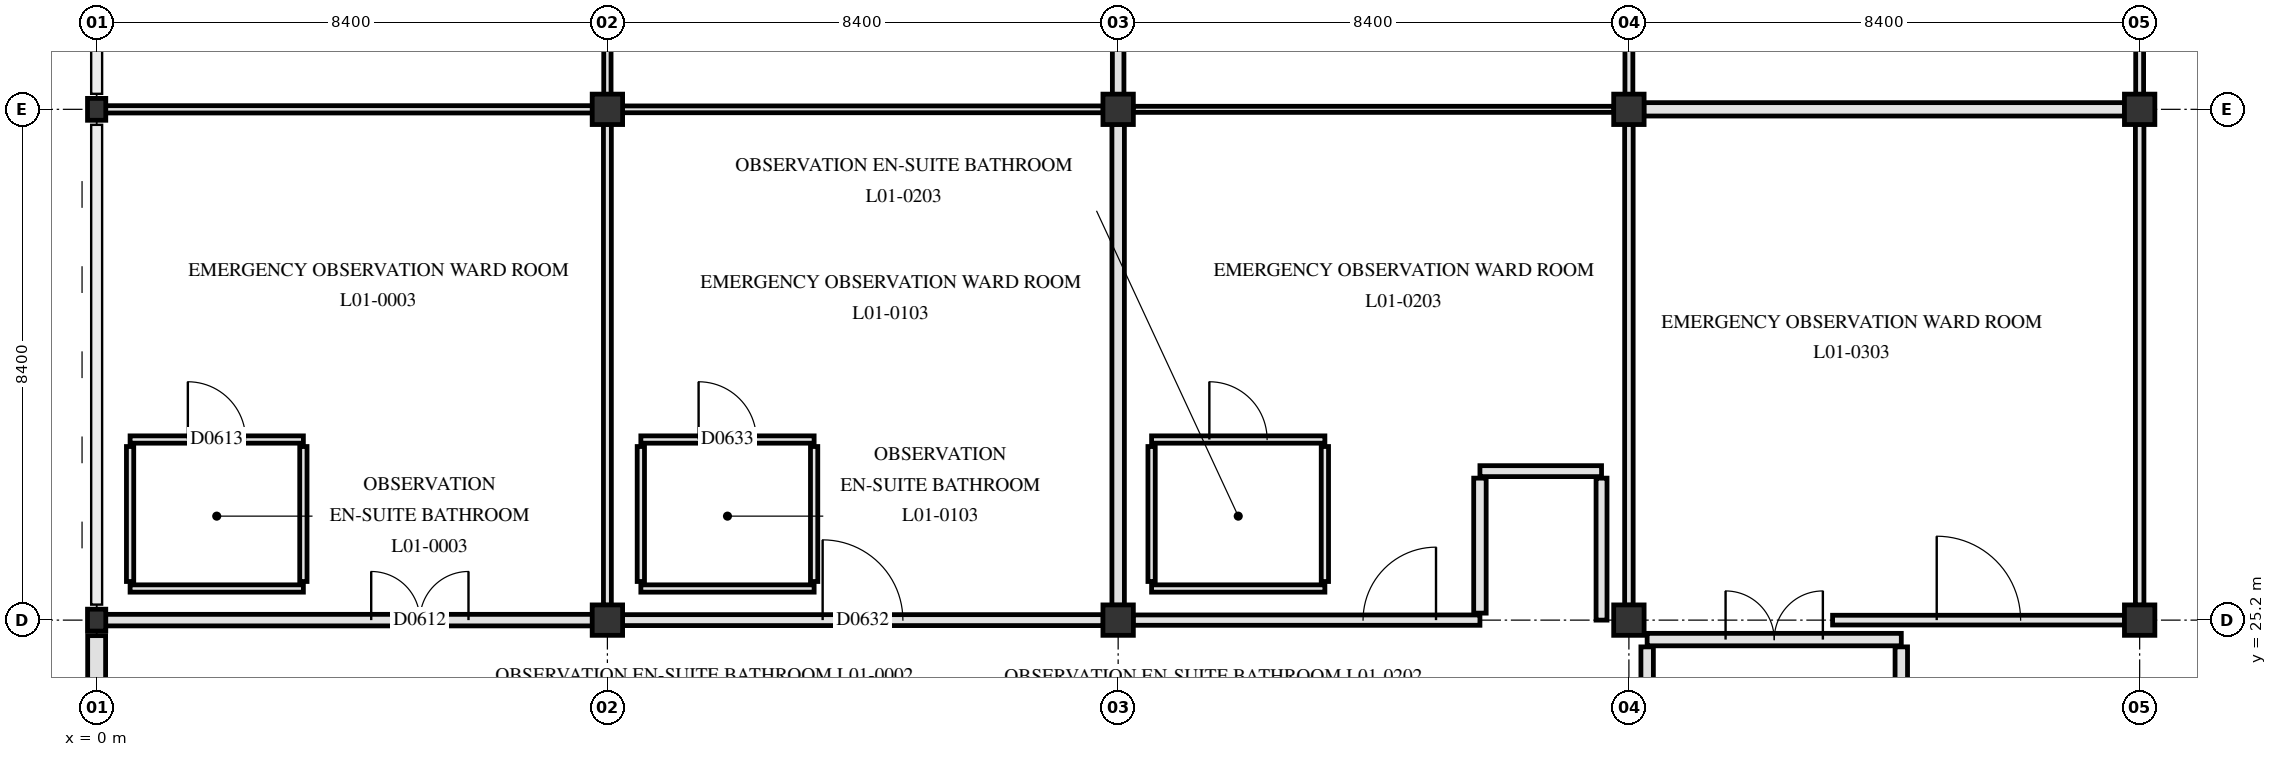
"""IFC4 building model, lengths in metres.
Left out: names, types, materials, properties, quantities, classifications, styles, units other than length and angle.
Written with IfcOpenShell. Run it as: python <this file> out.ifc"""

import sys

from ifc_helpers import new_model, si_unit, direction, frame, frame_2d, origin, origin_2d, place, context, subcontext, project, spatial, rectangle, i_section, extrude, element, fill, save


model = new_model("IFC4")
c1 = context("Model", 3, precision=1e-05, world=origin(), true_north=direction((0.0, 1.0)))
c2 = subcontext(c1, "Body", "Model", "MODEL_VIEW")
j1 = project(units=[si_unit("LENGTHUNIT", "METRE"), si_unit("PLANEANGLEUNIT", "RADIAN")], contexts=[c1])
p1 = place(None, origin())
s1 = spatial("IfcSite", under=j1, at=p1, CompositionType="ELEMENT")
p2 = place(p1, origin())
s2 = spatial("IfcBuilding", under=s1, at=p2, CompositionType="ELEMENT")
p3 = place(p2, frame((0.0, 0.0, 4.8)))
s3 = spatial("IfcBuildingStorey", under=s2, at=p3, CompositionType="ELEMENT", Elevation=4.8)
for number, where, z_axis, x_axis in (
    (1, (0.0, 25.2, 0.0), (0.0, 0.0, 1.0), (1.0, 0.0, 0.0)),
    (2, (0.0, 33.6, 0.0), (0.0, 0.0, 1.0), (1.0, 0.0, 0.0)),
):
    element("IfcColumn", number, at=place(p3, frame(where, z_axis=z_axis, x_axis=x_axis)), inside=s3, PredefinedType="COLUMN", context=c2, shape_type="SweptSolid", body=[
        extrude(i_section(OverallWidth=0.3, OverallDepth=0.36, WebThickness=0.012, FlangeThickness=0.022, FilletRadius=0.027, at=origin_2d()), origin(), (0.0, 0.0, 1.0), 4.5),
    ])
for number, where, z_axis, x_axis in (
    (3, (8.4, 25.2, 0.0), (0.0, 0.0, 1.0), (1.0, 0.0, 0.0)),
    (4, (8.4, 33.6, 0.0), (0.0, 0.0, 1.0), (1.0, 0.0, 0.0)),
    (5, (16.8, 25.2, 0.0), (0.0, 0.0, 1.0), (1.0, 0.0, 0.0)),
    (6, (16.8, 33.6, 0.0), (0.0, 0.0, 1.0), (1.0, 0.0, 0.0)),
    (7, (25.2, 25.2, 0.0), (0.0, 0.0, 1.0), (1.0, 0.0, 0.0)),
    (8, (25.2, 33.6, 0.0), (0.0, 0.0, 1.0), (1.0, 0.0, 0.0)),
    (9, (33.6, 25.2, 0.0), (0.0, 0.0, 1.0), (1.0, 0.0, 0.0)),
    (10, (33.6, 33.6, 0.0), (0.0, 0.0, 1.0), (1.0, 0.0, 0.0)),
):
    element("IfcColumn", number, at=place(p3, frame(where, z_axis=z_axis, x_axis=x_axis)), inside=s3, PredefinedType="COLUMN", context=c2, shape_type="SweptSolid", body=[
        extrude(rectangle(XDim=0.5, YDim=0.5, at=origin_2d()), origin(), (0.0, 0.0, 1.0), 4.5),
    ])
p4 = place(p3, frame((0.0, 17.055, 0.0), z_axis=(0.0, 0.0, 1.0), x_axis=(0.0, 1.0, 0.0)))
e11 = element("IfcWall", 11, at=p4, inside=s3, PredefinedType="SOLIDWALL", context=c2, shape_type="SweptSolid", body=[
    extrude(rectangle(XDim=7.89, YDim=0.295, at=frame_2d((3.945, 0.0))), origin(), (0.0, 0.0, 1.0), 3.44),
])
p5 = place(p4, frame((1.347, 0.0, 0.85)))
e12 = element("IfcOpeningElement", 12, at=p5, cuts=e11, PredefinedType="OPENING", context=c2, shape_type="SweptSolid", body=[
    extrude(rectangle(XDim=1.25, YDim=1.3, at=frame_2d((0.625, 0.65))), frame((0.0, 0.157, 0.0), z_axis=(0.0, -1.0, 0.0), x_axis=(1.0, 0.0, 0.0)), (0.0, 0.0, 1.0), 0.315),
])
p6 = place(p4, frame((5.242, 0.0, 0.85)))
e13 = element("IfcOpeningElement", 13, at=p6, cuts=e11, PredefinedType="OPENING", context=c2, shape_type="SweptSolid", body=[
    extrude(rectangle(XDim=1.35, YDim=1.3, at=frame_2d((0.675, 0.65))), frame((0.0, 0.157, 0.0), z_axis=(0.0, -1.0, 0.0), x_axis=(1.0, 0.0, 0.0)), (0.0, 0.0, 1.0), 0.315),
])
p7 = place(p3, frame((29.68, 20.64, 0.0), z_axis=(0.0, 0.0, 1.0), x_axis=(0.0, 1.0, 0.0)))
e14 = element("IfcWall", 14, at=p7, inside=s3, PredefinedType="PARTITIONING", context=c2, shape_type="SweptSolid", body=[
    extrude(rectangle(XDim=4.12, YDim=0.205, at=frame_2d((2.06, 0.0))), origin(), (0.0, 0.0, 1.0), 4.14),
])
p8 = place(p3, frame((25.5, 20.64, 0.0), z_axis=(0.0, 0.0, 1.0), x_axis=(0.0, 1.0, 0.0)))
e15 = element("IfcWall", 15, at=p8, inside=s3, PredefinedType="PARTITIONING", context=c2, shape_type="SweptSolid", body=[
    extrude(rectangle(XDim=4.12, YDim=0.205, at=frame_2d((2.06, 0.0))), origin(), (0.0, 0.0, 1.0), 3.59),
])
p9 = place(p3, frame((25.5, 24.88, 0.0), z_axis=(0.0, 0.0, 1.0), x_axis=(1.0, 0.0, 0.0)))
e16 = element("IfcWall", 16, at=p9, inside=s3, PredefinedType="PARTITIONING", context=c2, shape_type="SweptSolid", body=[
    extrude(rectangle(XDim=4.18, YDim=0.205, at=frame_2d((2.09, 0.0))), origin(), (0.0, 0.0, 1.0), 3.54),
])
p10 = place(p9, frame((1.29, 0.0, 0.0)))
e17 = element("IfcOpeningElement", 17, at=p10, cuts=e16, PredefinedType="OPENING", context=c2, shape_type="SweptSolid", body=[
    extrude(rectangle(XDim=1.6, YDim=2.25, at=frame_2d((0.8, 1.125))), frame((0.0, 0.113, 0.0), z_axis=(0.0, -1.0, 0.0), x_axis=(1.0, 0.0, 0.0)), (0.0, 0.0, 1.0), 0.225),
])
p11 = place(p3, frame((0.145, 25.2, 0.0), z_axis=(0.0, 0.0, 1.0), x_axis=(1.0, 0.0, 0.0)))
e18 = element("IfcWall", 18, at=p11, inside=s3, PredefinedType="PARTITIONING", context=c2, shape_type="SweptSolid", body=[
    extrude(rectangle(XDim=8.01, YDim=0.19, at=frame_2d((4.005, 0.0))), origin(), (0.0, 0.0, 1.0), 3.54),
])
p12 = place(p11, frame((4.371, 0.0, 0.0)))
e19 = element("IfcOpeningElement", 19, at=p12, cuts=e18, PredefinedType="OPENING", context=c2, shape_type="SweptSolid", body=[
    extrude(rectangle(XDim=1.6, YDim=2.25, at=frame_2d((0.8, 1.125))), frame((0.0, 0.105, 0.0), z_axis=(0.0, -1.0, 0.0), x_axis=(1.0, 0.0, 0.0)), (0.0, 0.0, 1.0), 0.21),
])
p13 = place(p3, frame((8.645, 25.2, 0.0), z_axis=(0.0, 0.0, 1.0), x_axis=(1.0, 0.0, 0.0)))
e20 = element("IfcWall", 20, at=p13, inside=s3, PredefinedType="PARTITIONING", context=c2, shape_type="SweptSolid", body=[
    extrude(rectangle(XDim=7.91, YDim=0.18, at=frame_2d((3.955, 0.0))), origin(), (0.0, 0.0, 1.0), 3.54),
])
p14 = place(p13, frame((3.295, 0.0, 0.0)))
e21 = element("IfcOpeningElement", 21, at=p14, cuts=e20, PredefinedType="OPENING", context=c2, shape_type="SweptSolid", body=[
    extrude(rectangle(XDim=1.32, YDim=2.18, at=frame_2d((0.66, 1.09))), frame((0.0, 0.1, 0.0), z_axis=(0.0, -1.0, 0.0), x_axis=(1.0, 0.0, 0.0)), (0.0, 0.0, 1.0), 0.2),
])
p15 = place(p3, frame((17.045, 25.2, 0.0), z_axis=(0.0, 0.0, 1.0), x_axis=(1.0, 0.0, 0.0)))
e22 = element("IfcWall", 22, at=p15, inside=s3, PredefinedType="PARTITIONING", context=c2, shape_type="SweptSolid", body=[
    extrude(rectangle(XDim=5.705, YDim=0.17, at=frame_2d((2.853, 0.0))), origin(), (0.0, 0.0, 1.0), 3.54),
])
p16 = place(p15, frame((3.783, 0.0, 0.0)))
e23 = element("IfcOpeningElement", 23, at=p16, cuts=e22, PredefinedType="OPENING", context=c2, shape_type="SweptSolid", body=[
    extrude(rectangle(XDim=1.2, YDim=2.15, at=frame_2d((0.6, 1.075))), frame((0.0, 0.095, 0.0), z_axis=(0.0, -1.0, 0.0), x_axis=(1.0, 0.0, 0.0)), (0.0, 0.0, 1.0), 0.19),
])
p17 = place(p3, frame((28.55, 25.2, 0.0), z_axis=(0.0, 0.0, 1.0), x_axis=(1.0, 0.0, 0.0)))
e24 = element("IfcWall", 24, at=p17, inside=s3, PredefinedType="PARTITIONING", context=c2, shape_type="SweptSolid", body=[
    extrude(rectangle(XDim=4.805, YDim=0.16, at=frame_2d((2.402, 0.0))), origin(), (0.0, 0.0, 1.0), 3.54),
])
p18 = place(p17, frame((1.712, 0.0, 0.0)))
e25 = element("IfcOpeningElement", 25, at=p18, cuts=e24, PredefinedType="OPENING", context=c2, shape_type="SweptSolid", body=[
    extrude(rectangle(XDim=1.38, YDim=2.22, at=frame_2d((0.69, 1.11))), frame((0.0, 0.09, 0.0), z_axis=(0.0, -1.0, 0.0), x_axis=(1.0, 0.0, 0.0)), (0.0, 0.0, 1.0), 0.18),
])
p19 = place(p3, frame((0.55, 25.72, 0.0), z_axis=(0.0, 0.0, 1.0), x_axis=(1.0, 0.0, 0.0)))
e26 = element("IfcWall", 26, at=p19, inside=s3, PredefinedType="PARTITIONING", context=c2, shape_type="SweptSolid", body=[
    extrude(rectangle(XDim=2.85, YDim=0.12, at=frame_2d((1.425, 0.0))), origin(), (0.0, 0.0, 1.0), 4.14),
])
p20 = place(p3, frame((8.95, 25.72, 0.0), z_axis=(0.0, 0.0, 1.0), x_axis=(1.0, 0.0, 0.0)))
e27 = element("IfcWall", 27, at=p20, inside=s3, PredefinedType="PARTITIONING", context=c2, shape_type="SweptSolid", body=[
    extrude(rectangle(XDim=2.85, YDim=0.12, at=frame_2d((1.425, 0.0))), origin(), (0.0, 0.0, 1.0), 4.14),
])
p21 = place(p3, frame((17.35, 25.72, 0.0), z_axis=(0.0, 0.0, 1.0), x_axis=(1.0, 0.0, 0.0)))
e28 = element("IfcWall", 28, at=p21, inside=s3, PredefinedType="PARTITIONING", context=c2, shape_type="SweptSolid", body=[
    extrude(rectangle(XDim=2.85, YDim=0.12, at=frame_2d((1.425, 0.0))), origin(), (0.0, 0.0, 1.0), 4.14),
])
p22 = place(p3, frame((22.75, 27.65, 0.0), z_axis=(0.0, 0.0, 1.0), x_axis=(1.0, 0.0, 0.0)))
e29 = element("IfcWall", 29, at=p22, inside=s3, PredefinedType="PARTITIONING", context=c2, shape_type="SweptSolid", body=[
    extrude(rectangle(XDim=2.0, YDim=0.18, at=frame_2d((1.0, 0.0))), origin(), (0.0, 0.0, 1.0), 4.14),
])
p23 = place(p3, frame((0.55, 28.17, 0.0), z_axis=(0.0, 0.0, 1.0), x_axis=(1.0, 0.0, 0.0)))
e30 = element("IfcWall", 30, at=p23, inside=s3, PredefinedType="PARTITIONING", context=c2, shape_type="SweptSolid", body=[
    extrude(rectangle(XDim=2.85, YDim=0.12, at=frame_2d((1.425, 0.0))), origin(), (0.0, 0.0, 1.0), 4.14),
])
p24 = place(p23, frame((0.95, 0.0, 0.0)))
e31 = element("IfcOpeningElement", 31, at=p24, cuts=e30, PredefinedType="OPENING", context=c2, shape_type="SweptSolid", body=[
    extrude(rectangle(XDim=0.95, YDim=2.1, at=frame_2d((0.475, 1.05))), frame((0.0, 0.07, 0.0), z_axis=(0.0, -1.0, 0.0), x_axis=(1.0, 0.0, 0.0)), (0.0, 0.0, 1.0), 0.14),
])
p25 = place(p3, frame((8.95, 28.17, 0.0), z_axis=(0.0, 0.0, 1.0), x_axis=(1.0, 0.0, 0.0)))
e32 = element("IfcWall", 32, at=p25, inside=s3, PredefinedType="PARTITIONING", context=c2, shape_type="SweptSolid", body=[
    extrude(rectangle(XDim=2.85, YDim=0.12, at=frame_2d((1.425, 0.0))), origin(), (0.0, 0.0, 1.0), 4.14),
])
p26 = place(p25, frame((0.95, 0.0, 0.0)))
e33 = element("IfcOpeningElement", 33, at=p26, cuts=e32, PredefinedType="OPENING", context=c2, shape_type="SweptSolid", body=[
    extrude(rectangle(XDim=0.95, YDim=2.1, at=frame_2d((0.475, 1.05))), frame((0.0, 0.07, 0.0), z_axis=(0.0, -1.0, 0.0), x_axis=(1.0, 0.0, 0.0)), (0.0, 0.0, 1.0), 0.14),
])
p27 = place(p3, frame((17.35, 28.17, 0.0), z_axis=(0.0, 0.0, 1.0), x_axis=(1.0, 0.0, 0.0)))
e34 = element("IfcWall", 34, at=p27, inside=s3, PredefinedType="PARTITIONING", context=c2, shape_type="SweptSolid", body=[
    extrude(rectangle(XDim=2.85, YDim=0.12, at=frame_2d((1.425, 0.0))), origin(), (0.0, 0.0, 1.0), 4.14),
])
p28 = place(p27, frame((0.95, 0.0, 0.0)))
e35 = element("IfcOpeningElement", 35, at=p28, cuts=e34, PredefinedType="OPENING", context=c2, shape_type="SweptSolid", body=[
    extrude(rectangle(XDim=0.95, YDim=2.1, at=frame_2d((0.475, 1.05))), frame((0.0, 0.07, 0.0), z_axis=(0.0, -1.0, 0.0), x_axis=(1.0, 0.0, 0.0)), (0.0, 0.0, 1.0), 0.14),
])
p29 = place(p3, frame((0.145, 33.6, 0.0), z_axis=(0.0, 0.0, 1.0), x_axis=(1.0, 0.0, 0.0)))
e36 = element("IfcWall", 36, at=p29, inside=s3, PredefinedType="PARTITIONING", context=c2, shape_type="SweptSolid", body=[
    extrude(rectangle(XDim=8.01, YDim=0.12, at=frame_2d((4.005, 0.0))), origin(), (0.0, 0.0, 1.0), 3.54),
])
p30 = place(p3, frame((8.645, 33.6, 0.0), z_axis=(0.0, 0.0, 1.0), x_axis=(1.0, 0.0, 0.0)))
e37 = element("IfcWall", 37, at=p30, inside=s3, PredefinedType="PARTITIONING", context=c2, shape_type="SweptSolid", body=[
    extrude(rectangle(XDim=7.91, YDim=0.112, at=frame_2d((3.955, 0.0))), origin(), (0.0, 0.0, 1.0), 3.54),
])
p31 = place(p3, frame((17.045, 33.6, 0.0), z_axis=(0.0, 0.0, 1.0), x_axis=(1.0, 0.0, 0.0)))
e38 = element("IfcWall", 38, at=p31, inside=s3, PredefinedType="PARTITIONING", context=c2, shape_type="SweptSolid", body=[
    extrude(rectangle(XDim=7.91, YDim=0.1, at=frame_2d((3.955, 0.0))), origin(), (0.0, 0.0, 1.0), 3.54),
])
p32 = place(p3, frame((25.445, 33.6, 0.0), z_axis=(0.0, 0.0, 1.0), x_axis=(1.0, 0.0, 0.0)))
e39 = element("IfcWall", 39, at=p32, inside=s3, PredefinedType="PARTITIONING", context=c2, shape_type="SweptSolid", body=[
    extrude(rectangle(XDim=7.91, YDim=0.22, at=frame_2d((3.955, 0.0))), origin(), (0.0, 0.0, 1.0), 3.54),
])
for number, where, z_axis, x_axis in (
    (40, (0.55, 25.835, 0.0), (0.0, 0.0, 1.0), (0.0, 1.0, 0.0)),
    (41, (3.4, 25.835, 0.0), (0.0, 0.0, 1.0), (0.0, 1.0, 0.0)),
):
    element("IfcWall", number, at=place(p3, frame(where, z_axis=z_axis, x_axis=x_axis)), inside=s3, PredefinedType="PARTITIONING", context=c2, shape_type="SweptSolid", body=[
        extrude(rectangle(XDim=2.22, YDim=0.12, at=frame_2d((1.11, 0.0))), origin(), (0.0, 0.0, 1.0), 4.14),
    ])
p33 = place(p3, frame((8.4, 25.445, 0.0), z_axis=(0.0, 0.0, 1.0), x_axis=(0.0, 1.0, 0.0)))
e42 = element("IfcWall", 42, at=p33, inside=s3, PredefinedType="PARTITIONING", context=c2, shape_type="SweptSolid", body=[
    extrude(rectangle(XDim=7.91, YDim=0.13, at=frame_2d((3.955, 0.0))), origin(), (0.0, 0.0, 1.0), 3.59),
])
p34 = place(p3, frame((8.4, 33.845, 0.0), z_axis=(0.0, 0.0, 1.0), x_axis=(0.0, 1.0, 0.0)))
e43 = element("IfcWall", 43, at=p34, inside=s3, PredefinedType="PARTITIONING", context=c2, shape_type="SweptSolid", body=[
    extrude(rectangle(XDim=7.91, YDim=0.12, at=frame_2d((3.955, 0.0))), origin(), (0.0, 0.0, 1.0), 3.59),
])
for number, where, z_axis, x_axis in (
    (44, (8.95, 25.835, 0.0), (0.0, 0.0, 1.0), (0.0, 1.0, 0.0)),
    (45, (11.8, 25.835, 0.0), (0.0, 0.0, 1.0), (0.0, 1.0, 0.0)),
):
    element("IfcWall", number, at=place(p3, frame(where, z_axis=z_axis, x_axis=x_axis)), inside=s3, PredefinedType="PARTITIONING", context=c2, shape_type="SweptSolid", body=[
        extrude(rectangle(XDim=2.22, YDim=0.12, at=frame_2d((1.11, 0.0))), origin(), (0.0, 0.0, 1.0), 4.14),
    ])
p35 = place(p3, frame((16.8, 25.445, 0.0), z_axis=(0.0, 0.0, 1.0), x_axis=(0.0, 1.0, 0.0)))
e46 = element("IfcWall", 46, at=p35, inside=s3, PredefinedType="PARTITIONING", context=c2, shape_type="SweptSolid", body=[
    extrude(rectangle(XDim=7.91, YDim=0.205, at=frame_2d((3.955, 0.0))), origin(), (0.0, 0.0, 1.0), 3.59),
])
p36 = place(p3, frame((16.8, 33.845, 0.0), z_axis=(0.0, 0.0, 1.0), x_axis=(0.0, 1.0, 0.0)))
e47 = element("IfcWall", 47, at=p36, inside=s3, PredefinedType="PARTITIONING", context=c2, shape_type="SweptSolid", body=[
    extrude(rectangle(XDim=7.91, YDim=0.19, at=frame_2d((3.955, 0.0))), origin(), (0.0, 0.0, 1.0), 3.59),
])
for number, where, z_axis, x_axis in (
    (48, (17.35, 25.835, 0.0), (0.0, 0.0, 1.0), (0.0, 1.0, 0.0)),
    (49, (20.2, 25.835, 0.0), (0.0, 0.0, 1.0), (0.0, 1.0, 0.0)),
):
    element("IfcWall", number, at=place(p3, frame(where, z_axis=z_axis, x_axis=x_axis)), inside=s3, PredefinedType="PARTITIONING", context=c2, shape_type="SweptSolid", body=[
        extrude(rectangle(XDim=2.22, YDim=0.12, at=frame_2d((1.11, 0.0))), origin(), (0.0, 0.0, 1.0), 4.14),
    ])
p37 = place(p3, frame((22.75, 25.315, 0.0), z_axis=(0.0, 0.0, 1.0), x_axis=(0.0, 1.0, 0.0)))
e50 = element("IfcWall", 50, at=p37, inside=s3, PredefinedType="PARTITIONING", context=c2, shape_type="SweptSolid", body=[
    extrude(rectangle(XDim=2.22, YDim=0.205, at=frame_2d((1.11, 0.0))), origin(), (0.0, 0.0, 1.0), 3.54),
])
p38 = place(p3, frame((24.75, 25.2, 0.0), z_axis=(0.0, 0.0, 1.0), x_axis=(0.0, 1.0, 0.0)))
e51 = element("IfcWall", 51, at=p38, inside=s3, PredefinedType="PARTITIONING", context=c2, shape_type="SweptSolid", body=[
    extrude(rectangle(XDim=2.335, YDim=0.18, at=frame_2d((1.167, 0.0))), origin(), (0.0, 0.0, 1.0), 3.54),
])
p39 = place(p3, frame((25.2, 25.445, 0.0), z_axis=(0.0, 0.0, 1.0), x_axis=(0.0, 1.0, 0.0)))
e52 = element("IfcWall", 52, at=p39, inside=s3, PredefinedType="PARTITIONING", context=c2, shape_type="SweptSolid", body=[
    extrude(rectangle(XDim=7.91, YDim=0.14, at=frame_2d((3.955, 0.0))), origin(), (0.0, 0.0, 1.0), 3.59),
])
p40 = place(p3, frame((25.2, 33.845, 0.0), z_axis=(0.0, 0.0, 1.0), x_axis=(0.0, 1.0, 0.0)))
e53 = element("IfcWall", 53, at=p40, inside=s3, PredefinedType="PARTITIONING", context=c2, shape_type="SweptSolid", body=[
    extrude(rectangle(XDim=7.91, YDim=0.13, at=frame_2d((3.955, 0.0))), origin(), (0.0, 0.0, 1.0), 3.59),
])
p41 = place(p3, frame((33.6, 25.445, 0.0), z_axis=(0.0, 0.0, 1.0), x_axis=(0.0, 1.0, 0.0)))
e54 = element("IfcWall", 54, at=p41, inside=s3, PredefinedType="PARTITIONING", context=c2, shape_type="SweptSolid", body=[
    extrude(rectangle(XDim=7.91, YDim=0.14, at=frame_2d((3.955, 0.0))), origin(), (0.0, 0.0, 1.0), 3.59),
])
p42 = place(p3, frame((33.6, 33.845, 0.0), z_axis=(0.0, 0.0, 1.0), x_axis=(0.0, 1.0, 0.0)))
e55 = element("IfcWall", 55, at=p42, inside=s3, PredefinedType="PARTITIONING", context=c2, shape_type="SweptSolid", body=[
    extrude(rectangle(XDim=7.91, YDim=0.13, at=frame_2d((3.955, 0.0))), origin(), (0.0, 0.0, 1.0), 3.59),
])
p43 = place(p10, origin())
e56 = element("IfcDoor", 56, at=p43, inside=s3, OperationType="DOUBLE_SWING_LEFT", PredefinedType="DOOR", context=c2, shape_type="SweptSolid", body=[
    extrude(rectangle(XDim=1.6, YDim=2.25, at=frame_2d((0.8, 1.125))), frame((0.0, 0.025, 0.0), z_axis=(0.0, -1.0, 0.0), x_axis=(1.0, 0.0, 0.0)), (0.0, 0.0, 1.0), 0.05),
])
fill(e17, e56)
p44 = place(p12, origin())
e57 = element("IfcDoor", 57, at=p44, inside=s3, OperationType="DOUBLE_SWING_LEFT", PredefinedType="DOOR", context=c2, shape_type="SweptSolid", body=[
    extrude(rectangle(XDim=1.6, YDim=2.25, at=frame_2d((0.8, 1.125))), frame((0.0, 0.025, 0.0), z_axis=(0.0, -1.0, 0.0), x_axis=(1.0, 0.0, 0.0)), (0.0, 0.0, 1.0), 0.05),
])
fill(e19, e57)
p45 = place(p24, origin())
e58 = element("IfcDoor", 58, at=p45, inside=s3, OperationType="SINGLE_SWING_LEFT", PredefinedType="DOOR", context=c2, shape_type="SweptSolid", body=[
    extrude(rectangle(XDim=0.95, YDim=2.1, at=frame_2d((0.475, 1.05))), frame((0.0, 0.025, 0.0), z_axis=(0.0, -1.0, 0.0), x_axis=(1.0, 0.0, 0.0)), (0.0, 0.0, 1.0), 0.05),
])
fill(e31, e58)
p46 = place(p14, origin())
e59 = element("IfcDoor", 59, at=p46, inside=s3, OperationType="SINGLE_SWING_LEFT", PredefinedType="DOOR", context=c2, shape_type="SweptSolid", body=[
    extrude(rectangle(XDim=1.32, YDim=2.18, at=frame_2d((0.66, 1.09))), frame((0.0, 0.025, 0.0), z_axis=(0.0, -1.0, 0.0), x_axis=(1.0, 0.0, 0.0)), (0.0, 0.0, 1.0), 0.05),
])
fill(e21, e59)
p47 = place(p26, origin())
e60 = element("IfcDoor", 60, at=p47, inside=s3, OperationType="SINGLE_SWING_LEFT", PredefinedType="DOOR", context=c2, shape_type="SweptSolid", body=[
    extrude(rectangle(XDim=0.95, YDim=2.1, at=frame_2d((0.475, 1.05))), frame((0.0, 0.025, 0.0), z_axis=(0.0, -1.0, 0.0), x_axis=(1.0, 0.0, 0.0)), (0.0, 0.0, 1.0), 0.05),
])
fill(e33, e60)
p48 = place(p16, origin())
e61 = element("IfcDoor", 61, at=p48, inside=s3, OperationType="SINGLE_SWING_RIGHT", PredefinedType="DOOR", context=c2, shape_type="SweptSolid", body=[
    extrude(rectangle(XDim=1.2, YDim=2.15, at=frame_2d((0.6, 1.075))), frame((0.0, 0.025, 0.0), z_axis=(0.0, -1.0, 0.0), x_axis=(1.0, 0.0, 0.0)), (0.0, 0.0, 1.0), 0.05),
])
fill(e23, e61)
p49 = place(p28, origin())
e62 = element("IfcDoor", 62, at=p49, inside=s3, OperationType="SINGLE_SWING_LEFT", PredefinedType="DOOR", context=c2, shape_type="SweptSolid", body=[
    extrude(rectangle(XDim=0.95, YDim=2.1, at=frame_2d((0.475, 1.05))), frame((0.0, 0.025, 0.0), z_axis=(0.0, -1.0, 0.0), x_axis=(1.0, 0.0, 0.0)), (0.0, 0.0, 1.0), 0.05),
])
fill(e35, e62)
p50 = place(p18, origin())
e63 = element("IfcDoor", 63, at=p50, inside=s3, OperationType="SINGLE_SWING_LEFT", PredefinedType="DOOR", context=c2, shape_type="SweptSolid", body=[
    extrude(rectangle(XDim=1.38, YDim=2.22, at=frame_2d((0.69, 1.11))), frame((0.0, 0.025, 0.0), z_axis=(0.0, -1.0, 0.0), x_axis=(1.0, 0.0, 0.0)), (0.0, 0.0, 1.0), 0.05),
])
fill(e25, e63)
save(model, sys.argv[1])
